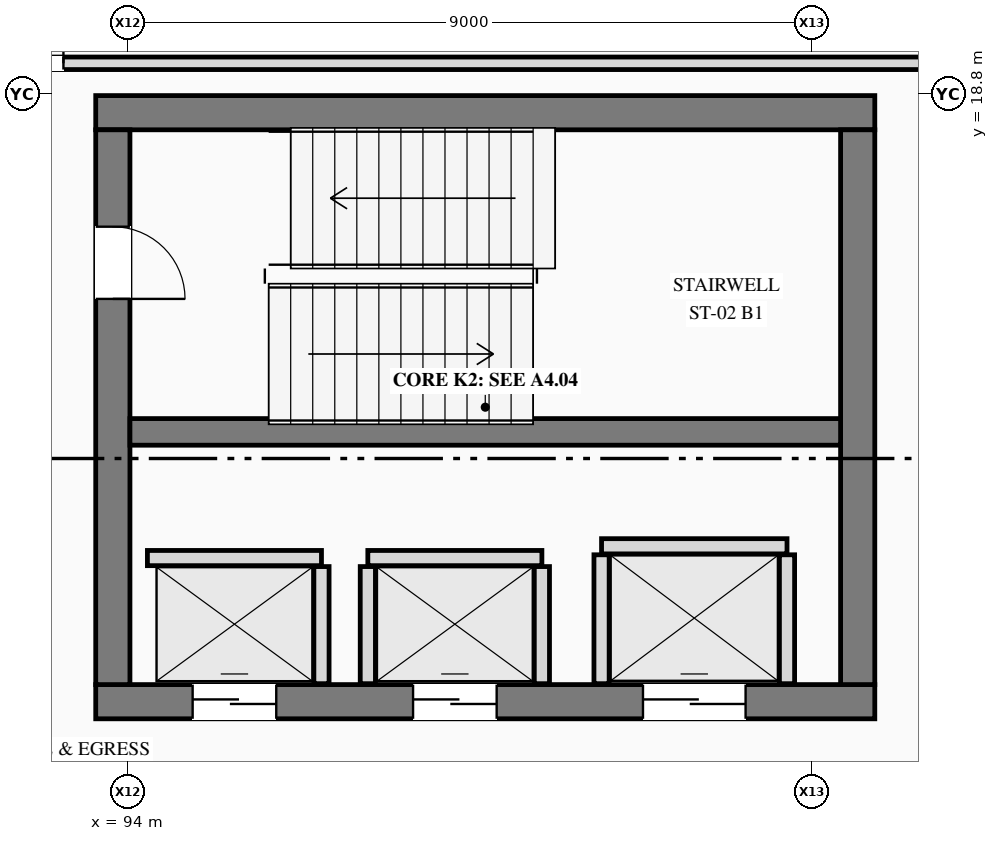
"""IFC4 building model, lengths in metres.
Left out: names, types, materials, properties, quantities, classifications, styles, units other than length and angle.
Written with IfcOpenShell. Run it as: python <this file> out.ifc"""

import sys

from ifc_helpers import new_model, si_unit, direction, frame, frame_2d, origin, place, context, subcontext, project, spatial, rectangle, extrude, element, fill, save


model = new_model("IFC4")
c1 = context("Model", 3, precision=1e-05, world=origin(), true_north=direction((0.0, 1.0)))
c2 = subcontext(c1, "Body", "Model", "MODEL_VIEW")
j1 = project(units=[si_unit("LENGTHUNIT", "METRE"), si_unit("PLANEANGLEUNIT", "RADIAN")], contexts=[c1])
p1 = place(None, origin())
s1 = spatial("IfcSite", under=j1, at=p1, CompositionType="ELEMENT")
p2 = place(p1, origin())
s2 = spatial("IfcBuilding", under=s1, at=p2, CompositionType="ELEMENT")
p3 = place(p2, frame((0.0, 0.0, -4.5)))
s3 = spatial("IfcBuildingStorey", under=s2, at=p3, CompositionType="ELEMENT", Elevation=-4.5)
p4 = place(p3, frame((93.575, 10.8, 0.0), z_axis=(0.0, 0.0, 1.0), x_axis=(1.0, 0.0, 0.0)))
e1 = element("IfcWall", 1, at=p4, inside=s3, PredefinedType="SHEAR", context=c2, shape_type="SweptSolid", body=[
    extrude(rectangle(XDim=10.25, YDim=0.45, at=frame_2d((5.125, 0.0))), origin(), (0.0, 0.0, 1.0), 4.5),
])
p5 = place(p4, frame((1.275, 0.0, 0.0)))
e2 = element("IfcOpeningElement", 2, at=p5, cuts=e1, PredefinedType="OPENING", context=c2, shape_type="SweptSolid", body=[
    extrude(rectangle(XDim=1.1, YDim=2.2, at=frame_2d((0.55, 1.1))), frame((0.0, 0.235, 0.0), z_axis=(0.0, -1.0, 0.0), x_axis=(1.0, 0.0, 0.0)), (0.0, 0.0, 1.0), 0.47),
])
p6 = place(p4, frame((4.175, 0.0, 0.0)))
e3 = element("IfcOpeningElement", 3, at=p6, cuts=e1, PredefinedType="OPENING", context=c2, shape_type="SweptSolid", body=[
    extrude(rectangle(XDim=1.1, YDim=2.2, at=frame_2d((0.55, 1.1))), frame((0.0, 0.235, 0.0), z_axis=(0.0, -1.0, 0.0), x_axis=(1.0, 0.0, 0.0)), (0.0, 0.0, 1.0), 0.47),
])
p7 = place(p4, frame((7.2, 0.0, 0.0)))
e4 = element("IfcOpeningElement", 4, at=p7, cuts=e1, PredefinedType="OPENING", context=c2, shape_type="SweptSolid", body=[
    extrude(rectangle(XDim=1.35, YDim=2.3, at=frame_2d((0.675, 1.15))), frame((0.0, 0.235, 0.0), z_axis=(0.0, -1.0, 0.0), x_axis=(1.0, 0.0, 0.0)), (0.0, 0.0, 1.0), 0.47),
])
p8 = place(p3, frame((103.825, 18.55, 0.0), z_axis=(0.0, 0.0, 1.0), x_axis=(-1.0, 0.0, 0.0)))
e5 = element("IfcWall", 5, at=p8, inside=s3, PredefinedType="SHEAR", context=c2, shape_type="SweptSolid", body=[
    extrude(rectangle(XDim=10.25, YDim=0.45, at=frame_2d((5.125, 0.0))), origin(), (0.0, 0.0, 1.0), 4.5),
])
p9 = place(p3, frame((93.8, 18.325, 0.0), z_axis=(0.0, 0.0, 1.0), x_axis=(0.0, -1.0, 0.0)))
e6 = element("IfcWall", 6, at=p9, inside=s3, PredefinedType="SHEAR", context=c2, shape_type="SweptSolid", body=[
    extrude(rectangle(XDim=7.3, YDim=0.45, at=frame_2d((3.65, 0.0))), origin(), (0.0, 0.0, 1.0), 4.5),
])
p10 = place(p9, frame((1.275, 0.0, 0.0)))
e7 = element("IfcOpeningElement", 7, at=p10, cuts=e6, PredefinedType="OPENING", context=c2, shape_type="SweptSolid", body=[
    extrude(rectangle(XDim=0.95, YDim=2.2, at=frame_2d((0.475, 1.1))), frame((0.0, 0.235, 0.0), z_axis=(0.0, -1.0, 0.0), x_axis=(1.0, 0.0, 0.0)), (0.0, 0.0, 1.0), 0.47),
])
p11 = place(p3, frame((103.6, 11.025, 0.0), z_axis=(0.0, 0.0, 1.0), x_axis=(0.0, 1.0, 0.0)))
e8 = element("IfcWall", 8, at=p11, inside=s3, PredefinedType="SHEAR", context=c2, shape_type="SweptSolid", body=[
    extrude(rectangle(XDim=7.3, YDim=0.45, at=frame_2d((3.65, 0.0))), origin(), (0.0, 0.0, 1.0), 4.5),
])
p12 = place(p3, frame((94.025, 14.35, 0.0), z_axis=(0.0, 0.0, 1.0), x_axis=(1.0, 0.0, 0.0)))
e9 = element("IfcWall", 9, at=p12, inside=s3, PredefinedType="SHEAR", context=c2, shape_type="SweptSolid", body=[
    extrude(rectangle(XDim=9.35, YDim=0.35, at=frame_2d((4.675, 0.0))), origin(), (0.0, 0.0, 1.0), 4.5),
])
p13 = place(p3, frame((94.255, 12.69, 0.0), z_axis=(0.0, 0.0, 1.0), x_axis=(1.0, 0.0, 0.0)))
e10 = element("IfcWall", 10, at=p13, inside=s3, PredefinedType="PLUMBINGWALL", context=c2, shape_type="SweptSolid", body=[
    extrude(rectangle(XDim=2.29, YDim=0.2, at=frame_2d((1.145, 0.0))), origin(), (0.0, 0.0, 1.0), 4.175),
])
p14 = place(p3, frame((96.545, 11.037, 0.0), z_axis=(0.0, 0.0, 1.0), x_axis=(0.0, 1.0, 0.0)))
e11 = element("IfcWall", 11, at=p14, inside=s3, PredefinedType="PLUMBINGWALL", context=c2, shape_type="SweptSolid", body=[
    extrude(rectangle(XDim=1.541, YDim=0.2, at=frame_2d((0.771, 0.0))), origin(), (0.0, 0.0, 1.0), 4.175),
])
p15 = place(p3, frame((97.155, 12.69, 0.0), z_axis=(0.0, 0.0, 1.0), x_axis=(1.0, 0.0, 0.0)))
e12 = element("IfcWall", 12, at=p15, inside=s3, PredefinedType="PLUMBINGWALL", context=c2, shape_type="SweptSolid", body=[
    extrude(rectangle(XDim=2.29, YDim=0.2, at=frame_2d((1.145, 0.0))), origin(), (0.0, 0.0, 1.0), 4.175),
])
for number, where, z_axis, x_axis in (
    (13, (97.155, 11.037, 0.0), (0.0, 0.0, 1.0), (0.0, 1.0, 0.0)),
    (14, (99.445, 11.037, 0.0), (0.0, 0.0, 1.0), (0.0, 1.0, 0.0)),
):
    element("IfcWall", number, at=place(p3, frame(where, z_axis=z_axis, x_axis=x_axis)), inside=s3, PredefinedType="PLUMBINGWALL", context=c2, shape_type="SweptSolid", body=[
        extrude(rectangle(XDim=1.541, YDim=0.2, at=frame_2d((0.771, 0.0))), origin(), (0.0, 0.0, 1.0), 4.175),
    ])
p16 = place(p3, frame((100.23, 12.845, 0.0), z_axis=(0.0, 0.0, 1.0), x_axis=(1.0, 0.0, 0.0)))
e15 = element("IfcWall", 15, at=p16, inside=s3, PredefinedType="PLUMBINGWALL", context=c2, shape_type="SweptSolid", body=[
    extrude(rectangle(XDim=2.44, YDim=0.2, at=frame_2d((1.22, 0.0))), origin(), (0.0, 0.0, 1.0), 4.175),
])
for number, where, z_axis, x_axis in (
    (16, (100.23, 11.037, 0.0), (0.0, 0.0, 1.0), (0.0, 1.0, 0.0)),
    (17, (102.67, 11.037, 0.0), (0.0, 0.0, 1.0), (0.0, 1.0, 0.0)),
):
    element("IfcWall", number, at=place(p3, frame(where, z_axis=z_axis, x_axis=x_axis)), inside=s3, PredefinedType="PLUMBINGWALL", context=c2, shape_type="SweptSolid", body=[
        extrude(rectangle(XDim=1.696, YDim=0.2, at=frame_2d((0.848, 0.0))), origin(), (0.0, 0.0, 1.0), 4.175),
    ])
p17 = place(p3, frame((0.5, 19.2, 0.0), z_axis=(0.0, 0.0, 1.0), x_axis=(1.0, 0.0, 0.0)))
e18 = element("IfcWall", 18, at=p17, inside=s3, PredefinedType="PARTITIONING", context=c2, shape_type="SweptSolid", body=[
    extrude(rectangle(XDim=146.5, YDim=0.165, at=frame_2d((73.25, 0.0))), origin(), (0.0, 0.0, 1.0), 3.649),
])
p18 = place(p17, frame((91.15, 0.0, 0.0)))
e19 = element("IfcOpeningElement", 19, at=p18, cuts=e18, PredefinedType="OPENING", context=c2, shape_type="SweptSolid", body=[
    extrude(rectangle(XDim=1.5, YDim=2.25, at=frame_2d((0.75, 1.125))), frame((0.0, 0.093, 0.0), z_axis=(0.0, -1.0, 0.0), x_axis=(1.0, 0.0, 0.0)), (0.0, 0.0, 1.0), 0.185),
])
p19 = place(p10, origin())
e20 = element("IfcDoor", 20, at=p19, inside=s3, OperationType="SINGLE_SWING_RIGHT", PredefinedType="DOOR", context=c2, shape_type="SweptSolid", body=[
    extrude(rectangle(XDim=0.95, YDim=2.2, at=frame_2d((0.475, 1.1))), frame((0.0, 0.025, 0.0), z_axis=(0.0, -1.0, 0.0), x_axis=(1.0, 0.0, 0.0)), (0.0, 0.0, 1.0), 0.05),
])
fill(e7, e20)
p20 = place(p5, origin())
e21 = element("IfcDoor", 21, at=p20, inside=s3, OperationType="SLIDING_TO_LEFT", PredefinedType="DOOR", context=c2, shape_type="SweptSolid", body=[
    extrude(rectangle(XDim=1.1, YDim=2.2, at=frame_2d((0.55, 1.1))), frame((0.0, 0.025, 0.0), z_axis=(0.0, -1.0, 0.0), x_axis=(1.0, 0.0, 0.0)), (0.0, 0.0, 1.0), 0.05),
])
fill(e2, e21)
p21 = place(p6, origin())
e22 = element("IfcDoor", 22, at=p21, inside=s3, OperationType="SLIDING_TO_RIGHT", PredefinedType="DOOR", context=c2, shape_type="SweptSolid", body=[
    extrude(rectangle(XDim=1.1, YDim=2.2, at=frame_2d((0.55, 1.1))), frame((0.0, 0.025, 0.0), z_axis=(0.0, -1.0, 0.0), x_axis=(1.0, 0.0, 0.0)), (0.0, 0.0, 1.0), 0.05),
])
fill(e3, e22)
p22 = place(p7, origin())
e23 = element("IfcDoor", 23, at=p22, inside=s3, OperationType="SLIDING_TO_LEFT", PredefinedType="DOOR", context=c2, shape_type="SweptSolid", body=[
    extrude(rectangle(XDim=1.35, YDim=2.3, at=frame_2d((0.675, 1.15))), frame((0.0, 0.025, 0.0), z_axis=(0.0, -1.0, 0.0), x_axis=(1.0, 0.0, 0.0)), (0.0, 0.0, 1.0), 0.05),
])
fill(e4, e23)
p23 = place(p18, origin())
e24 = element("IfcDoor", 24, at=p23, inside=s3, OperationType="DOUBLE_DOOR_SINGLE_SWING", PredefinedType="DOOR", context=c2, shape_type="SweptSolid", body=[
    extrude(rectangle(XDim=1.5, YDim=2.25, at=frame_2d((0.75, 1.125))), frame((0.0, 0.025, 0.0), z_axis=(0.0, -1.0, 0.0), x_axis=(1.0, 0.0, 0.0)), (0.0, 0.0, 1.0), 0.05),
])
fill(e19, e24)
save(model, sys.argv[1])
